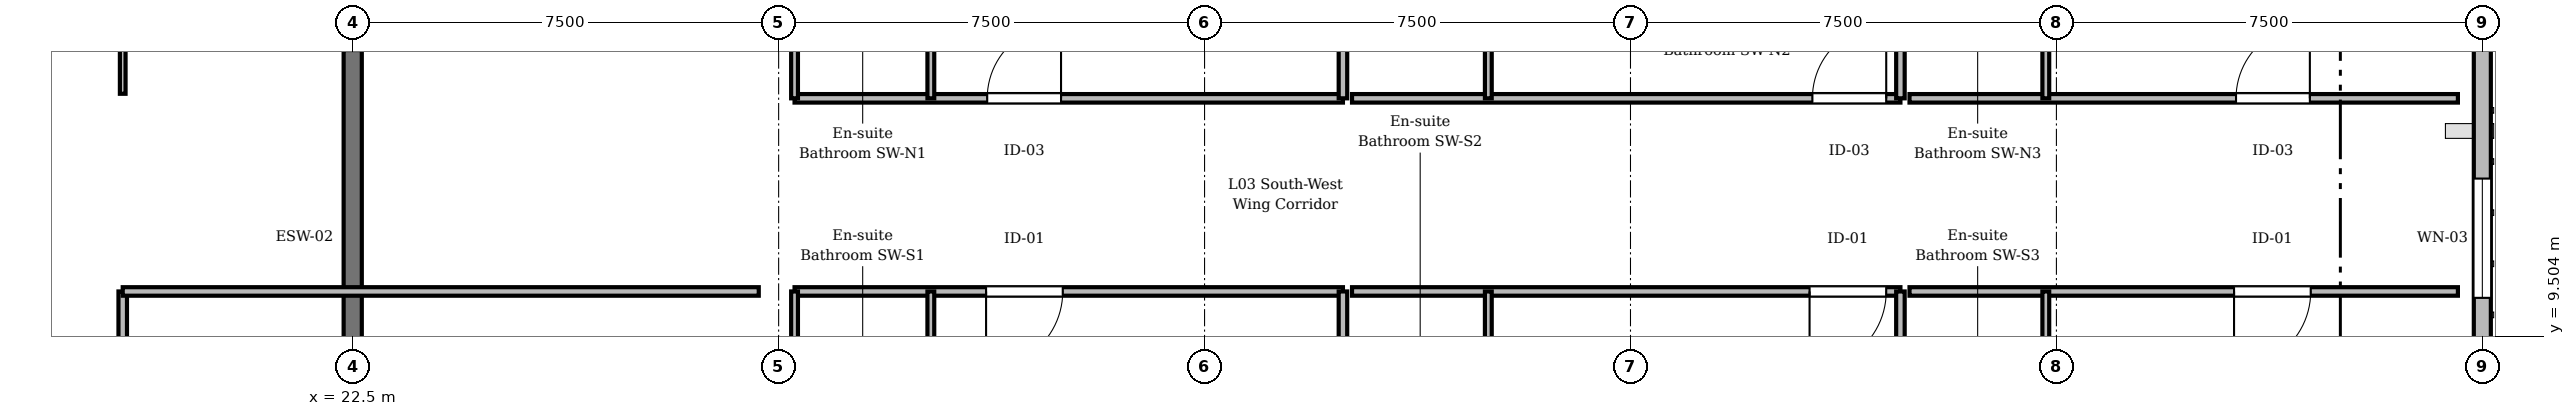
"""IFC4 building model, lengths in metres.
Left out: names, types, materials, properties, quantities, classifications, styles, units other than length and angle.
Written with IfcOpenShell. Run it as: python <this file> out.ifc"""

import sys

from ifc_helpers import new_model, si_unit, direction, frame, frame_2d, origin, place, context, subcontext, project, spatial, rectangle, extrude, element, fill, save


model = new_model("IFC4")
c1 = context("Model", 3, precision=1e-05, world=origin(), true_north=direction((0.0, 1.0)))
c2 = subcontext(c1, "Body", "Model", "MODEL_VIEW")
j1 = project(units=[si_unit("LENGTHUNIT", "METRE"), si_unit("PLANEANGLEUNIT", "RADIAN")], contexts=[c1])
p1 = place(None, origin())
s1 = spatial("IfcSite", under=j1, at=p1, CompositionType="ELEMENT")
p2 = place(p1, origin())
s2 = spatial("IfcBuilding", under=s1, at=p2, CompositionType="ELEMENT")
p3 = place(p2, frame((0.0, 0.0, 14.1)))
s3 = spatial("IfcBuildingStorey", under=s2, at=p3, CompositionType="ELEMENT", Elevation=14.1)
p4 = place(p3, frame((22.5, 7.95, 0.0), z_axis=(0.0, 0.0, 1.0), x_axis=(0.0, 1.0, 0.0)))
e1 = element("IfcWall", 1, at=p4, inside=s3, PredefinedType="SHEAR", context=c2, shape_type="SweptSolid", body=[
    extrude(rectangle(XDim=6.6, YDim=0.32, at=frame_2d((3.3, 0.0))), origin(), (0.0, 0.0, 1.0), 2.92),
])
p5 = place(p3, frame((60.0, 14.715, 0.0), z_axis=(0.0, 0.0, 1.0), x_axis=(0.0, -1.0, 0.0)))
e2 = element("IfcWall", 2, at=p5, inside=s3, PredefinedType="STANDARD", context=c2, shape_type="SweptSolid", body=[
    extrude(rectangle(XDim=6.955, YDim=0.3, at=frame_2d((3.478, 0.0))), origin(), (0.0, 0.0, 1.0), 2.87),
])
p6 = place(p5, frame((2.427, 0.0, 0.9)))
e3 = element("IfcOpeningElement", 3, at=p6, cuts=e2, PredefinedType="OPENING", context=c2, shape_type="SweptSolid", body=[
    extrude(rectangle(XDim=2.1, YDim=1.69, at=frame_2d((1.05, 0.845))), frame((0.0, 0.16, 0.0), z_axis=(0.0, -1.0, 0.0), x_axis=(1.0, 0.0, 0.0)), (0.0, 0.0, 1.0), 0.32),
])
p7 = place(p3, frame((18.45, 10.3, 0.0), z_axis=(0.0, 0.0, 1.0), x_axis=(0.0, -1.0, 0.0)))
e4 = element("IfcWall", 4, at=p7, inside=s3, PredefinedType="PARTITIONING", context=c2, shape_type="SweptSolid", body=[
    extrude(rectangle(XDim=9.95, YDim=0.15, at=frame_2d((4.975, 0.0))), origin(), (0.0, 0.0, 1.0), 3.455),
])
p8 = place(p7, frame((5.92, 0.0, 0.0)))
e5 = element("IfcOpeningElement", 5, at=p8, cuts=e4, PredefinedType="OPENING", context=c2, shape_type="SweptSolid", body=[
    extrude(rectangle(XDim=1.35, YDim=2.25, at=frame_2d((0.675, 1.125))), frame((0.0, 0.085, 0.0), z_axis=(0.0, -1.0, 0.0), x_axis=(1.0, 0.0, 0.0)), (0.0, 0.0, 1.0), 0.17),
])
p9 = place(p3, frame((18.45, 21.515, 0.0), z_axis=(0.0, 0.0, 1.0), x_axis=(0.0, -1.0, 0.0)))
e6 = element("IfcWall", 6, at=p9, inside=s3, PredefinedType="PARTITIONING", context=c2, shape_type="SweptSolid", body=[
    extrude(rectangle(XDim=7.735, YDim=0.1, at=frame_2d((3.867, 0.0))), origin(), (0.0, 0.0, 1.0), 3.455),
])
p10 = place(p9, frame((2.075, 0.0, 0.0)))
e7 = element("IfcOpeningElement", 7, at=p10, cuts=e6, PredefinedType="OPENING", context=c2, shape_type="SweptSolid", body=[
    extrude(rectangle(XDim=1.15, YDim=2.2, at=frame_2d((0.575, 1.1))), frame((0.0, 0.06, 0.0), z_axis=(0.0, -1.0, 0.0), x_axis=(1.0, 0.0, 0.0)), (0.0, 0.0, 1.0), 0.12),
])
p11 = place(p3, frame((39.937, 10.3, 0.0), z_axis=(0.0, 0.0, 1.0), x_axis=(-1.0, 0.0, 0.0)))
e8 = element("IfcWall", 8, at=p11, inside=s3, PredefinedType="PARTITIONING", context=c2, shape_type="SweptSolid", body=[
    extrude(rectangle(XDim=9.657, YDim=0.15, at=frame_2d((4.828, 0.0))), origin(), (0.0, 0.0, 1.0), 3.455),
])
p12 = place(p11, frame((4.934, 0.0, 0.0)))
e9 = element("IfcOpeningElement", 9, at=p12, cuts=e8, PredefinedType="OPENING", context=c2, shape_type="SweptSolid", body=[
    extrude(rectangle(XDim=1.35, YDim=2.25, at=frame_2d((0.675, 1.125))), frame((0.0, 0.085, 0.0), z_axis=(0.0, -1.0, 0.0), x_axis=(1.0, 0.0, 0.0)), (0.0, 0.0, 1.0), 0.17),
])
p13 = place(p3, frame((32.68, 8.3, 0.0), z_axis=(0.0, 0.0, 1.0), x_axis=(0.0, 1.0, 0.0)))
e10 = element("IfcWall", 10, at=p13, inside=s3, PredefinedType="PARTITIONING", context=c2, shape_type="SweptSolid", body=[
    extrude(rectangle(XDim=2.0, YDim=0.12, at=frame_2d((1.0, 0.0))), origin(), (0.0, 0.0, 1.0), 3.455),
])
p14 = place(p3, frame((30.28, 13.7, 0.0), z_axis=(0.0, 0.0, 1.0), x_axis=(1.0, 0.0, 0.0)))
e11 = element("IfcWall", 11, at=p14, inside=s3, PredefinedType="PARTITIONING", context=c2, shape_type="SweptSolid", body=[
    extrude(rectangle(XDim=9.657, YDim=0.15, at=frame_2d((4.828, 0.0))), origin(), (0.0, 0.0, 1.0), 3.455),
])
p15 = place(p14, frame((3.393, 0.0, 0.0)))
e12 = element("IfcOpeningElement", 12, at=p15, cuts=e11, PredefinedType="OPENING", context=c2, shape_type="SweptSolid", body=[
    extrude(rectangle(XDim=1.3, YDim=2.2, at=frame_2d((0.65, 1.1))), frame((0.0, 0.085, 0.0), z_axis=(0.0, -1.0, 0.0), x_axis=(1.0, 0.0, 0.0)), (0.0, 0.0, 1.0), 0.17),
])
p16 = place(p3, frame((32.68, 13.7, 0.0), z_axis=(0.0, 0.0, 1.0), x_axis=(0.0, 1.0, 0.0)))
e13 = element("IfcWall", 13, at=p16, inside=s3, PredefinedType="PARTITIONING", context=c2, shape_type="SweptSolid", body=[
    extrude(rectangle(XDim=2.0, YDim=0.12, at=frame_2d((1.0, 0.0))), origin(), (0.0, 0.0, 1.0), 3.455),
])
p17 = place(p3, frame((49.753, 10.3, 0.0), z_axis=(0.0, 0.0, 1.0), x_axis=(-1.0, 0.0, 0.0)))
e14 = element("IfcWall", 14, at=p17, inside=s3, PredefinedType="PARTITIONING", context=c2, shape_type="SweptSolid", body=[
    extrude(rectangle(XDim=9.657, YDim=0.15, at=frame_2d((4.828, 0.0))), origin(), (0.0, 0.0, 1.0), 3.455),
])
p18 = place(p17, frame((0.25, 0.0, 0.0)))
e15 = element("IfcOpeningElement", 15, at=p18, cuts=e14, PredefinedType="OPENING", context=c2, shape_type="SweptSolid", body=[
    extrude(rectangle(XDim=1.35, YDim=2.25, at=frame_2d((0.675, 1.125))), frame((0.0, 0.085, 0.0), z_axis=(0.0, -1.0, 0.0), x_axis=(1.0, 0.0, 0.0)), (0.0, 0.0, 1.0), 0.17),
])
p19 = place(p3, frame((42.497, 8.3, 0.0), z_axis=(0.0, 0.0, 1.0), x_axis=(0.0, 1.0, 0.0)))
e16 = element("IfcWall", 16, at=p19, inside=s3, PredefinedType="PARTITIONING", context=c2, shape_type="SweptSolid", body=[
    extrude(rectangle(XDim=2.0, YDim=0.12, at=frame_2d((1.0, 0.0))), origin(), (0.0, 0.0, 1.0), 3.455),
])
p20 = place(p3, frame((40.097, 13.7, 0.0), z_axis=(0.0, 0.0, 1.0), x_axis=(1.0, 0.0, 0.0)))
e17 = element("IfcWall", 17, at=p20, inside=s3, PredefinedType="PARTITIONING", context=c2, shape_type="SweptSolid", body=[
    extrude(rectangle(XDim=9.657, YDim=0.15, at=frame_2d((4.828, 0.0))), origin(), (0.0, 0.0, 1.0), 3.455),
])
p21 = place(p20, frame((8.107, 0.0, 0.0)))
e18 = element("IfcOpeningElement", 18, at=p21, cuts=e17, PredefinedType="OPENING", context=c2, shape_type="SweptSolid", body=[
    extrude(rectangle(XDim=1.3, YDim=2.2, at=frame_2d((0.65, 1.1))), frame((0.0, 0.085, 0.0), z_axis=(0.0, -1.0, 0.0), x_axis=(1.0, 0.0, 0.0)), (0.0, 0.0, 1.0), 0.17),
])
p22 = place(p3, frame((42.497, 13.7, 0.0), z_axis=(0.0, 0.0, 1.0), x_axis=(0.0, 1.0, 0.0)))
e19 = element("IfcWall", 19, at=p22, inside=s3, PredefinedType="PARTITIONING", context=c2, shape_type="SweptSolid", body=[
    extrude(rectangle(XDim=2.0, YDim=0.12, at=frame_2d((1.0, 0.0))), origin(), (0.0, 0.0, 1.0), 3.455),
])
p23 = place(p3, frame((59.57, 10.3, 0.0), z_axis=(0.0, 0.0, 1.0), x_axis=(-1.0, 0.0, 0.0)))
e20 = element("IfcWall", 20, at=p23, inside=s3, PredefinedType="PARTITIONING", context=c2, shape_type="SweptSolid", body=[
    extrude(rectangle(XDim=9.657, YDim=0.15, at=frame_2d((4.828, 0.0))), origin(), (0.0, 0.0, 1.0), 3.455),
])
p24 = place(p23, frame((2.592, 0.0, 0.0)))
e21 = element("IfcOpeningElement", 21, at=p24, cuts=e20, PredefinedType="OPENING", context=c2, shape_type="SweptSolid", body=[
    extrude(rectangle(XDim=1.35, YDim=2.25, at=frame_2d((0.675, 1.125))), frame((0.0, 0.085, 0.0), z_axis=(0.0, -1.0, 0.0), x_axis=(1.0, 0.0, 0.0)), (0.0, 0.0, 1.0), 0.17),
])
p25 = place(p3, frame((52.313, 8.3, 0.0), z_axis=(0.0, 0.0, 1.0), x_axis=(0.0, 1.0, 0.0)))
e22 = element("IfcWall", 22, at=p25, inside=s3, PredefinedType="PARTITIONING", context=c2, shape_type="SweptSolid", body=[
    extrude(rectangle(XDim=2.0, YDim=0.12, at=frame_2d((1.0, 0.0))), origin(), (0.0, 0.0, 1.0), 2.905),
])
p26 = place(p3, frame((49.913, 13.7, 0.0), z_axis=(0.0, 0.0, 1.0), x_axis=(1.0, 0.0, 0.0)))
e23 = element("IfcWall", 23, at=p26, inside=s3, PredefinedType="PARTITIONING", context=c2, shape_type="SweptSolid", body=[
    extrude(rectangle(XDim=9.657, YDim=0.15, at=frame_2d((4.828, 0.0))), origin(), (0.0, 0.0, 1.0), 3.455),
])
p27 = place(p26, frame((5.75, 0.0, 0.0)))
e24 = element("IfcOpeningElement", 24, at=p27, cuts=e23, PredefinedType="OPENING", context=c2, shape_type="SweptSolid", body=[
    extrude(rectangle(XDim=1.3, YDim=2.2, at=frame_2d((0.65, 1.1))), frame((0.0, 0.085, 0.0), z_axis=(0.0, -1.0, 0.0), x_axis=(1.0, 0.0, 0.0)), (0.0, 0.0, 1.0), 0.17),
])
p28 = place(p3, frame((52.313, 13.7, 0.0), z_axis=(0.0, 0.0, 1.0), x_axis=(0.0, 1.0, 0.0)))
e25 = element("IfcWall", 25, at=p28, inside=s3, PredefinedType="PARTITIONING", context=c2, shape_type="SweptSolid", body=[
    extrude(rectangle(XDim=2.0, YDim=0.12, at=frame_2d((1.0, 0.0))), origin(), (0.0, 0.0, 1.0), 2.905),
])
p29 = place(p3, frame((18.45, 10.3, 0.0), z_axis=(0.0, 0.0, 1.0), x_axis=(1.0, 0.0, 0.0)))
e26 = element("IfcWall", 26, at=p29, inside=s3, PredefinedType="PARTITIONING", context=c2, shape_type="SweptSolid", body=[
    extrude(rectangle(XDim=11.2, YDim=0.15, at=frame_2d((5.6, 0.0))), origin(), (0.0, 0.0, 1.0), 3.455),
])
p30 = place(p3, frame((39.937, 0.35, 0.0), z_axis=(0.0, 0.0, 1.0), x_axis=(0.0, 1.0, 0.0)))
e27 = element("IfcWall", 27, at=p30, inside=s3, PredefinedType="PARTITIONING", context=c2, shape_type="SweptSolid", body=[
    extrude(rectangle(XDim=9.95, YDim=0.15, at=frame_2d((4.975, 0.0))), origin(), (0.0, 0.0, 1.0), 3.455),
])
p31 = place(p3, frame((39.937, 13.7, 0.0), z_axis=(0.0, 0.0, 1.0), x_axis=(0.0, 1.0, 0.0)))
e28 = element("IfcWall", 28, at=p31, inside=s3, PredefinedType="PARTITIONING", context=c2, shape_type="SweptSolid", body=[
    extrude(rectangle(XDim=8.45, YDim=0.15, at=frame_2d((4.225, 0.0))), origin(), (0.0, 0.0, 1.0), 3.455),
])
p32 = place(p3, frame((49.753, 0.35, 0.0), z_axis=(0.0, 0.0, 1.0), x_axis=(0.0, 1.0, 0.0)))
e29 = element("IfcWall", 29, at=p32, inside=s3, PredefinedType="PARTITIONING", context=c2, shape_type="SweptSolid", body=[
    extrude(rectangle(XDim=9.95, YDim=0.15, at=frame_2d((4.975, 0.0))), origin(), (0.0, 0.0, 1.0), 3.455),
])
p33 = place(p3, frame((49.753, 13.7, 0.0), z_axis=(0.0, 0.0, 1.0), x_axis=(0.0, 1.0, 0.0)))
e30 = element("IfcWall", 30, at=p33, inside=s3, PredefinedType="PARTITIONING", context=c2, shape_type="SweptSolid", body=[
    extrude(rectangle(XDim=8.45, YDim=0.15, at=frame_2d((4.225, 0.0))), origin(), (0.0, 0.0, 1.0), 3.455),
])
p34 = place(p3, frame((30.28, 8.3, 0.0), z_axis=(0.0, 0.0, 1.0), x_axis=(0.0, 1.0, 0.0)))
e31 = element("IfcWall", 31, at=p34, inside=s3, PredefinedType="PARTITIONING", context=c2, shape_type="SweptSolid", body=[
    extrude(rectangle(XDim=2.0, YDim=0.12, at=frame_2d((1.0, 0.0))), origin(), (0.0, 0.0, 1.0), 2.955),
])
p35 = place(p3, frame((30.28, 13.7, 0.0), z_axis=(0.0, 0.0, 1.0), x_axis=(0.0, 1.0, 0.0)))
e32 = element("IfcWall", 32, at=p35, inside=s3, PredefinedType="PARTITIONING", context=c2, shape_type="SweptSolid", body=[
    extrude(rectangle(XDim=2.0, YDim=0.12, at=frame_2d((1.0, 0.0))), origin(), (0.0, 0.0, 1.0), 2.905),
])
p36 = place(p6, origin())
e33 = element("IfcWindow", 33, at=p36, inside=s3, PartitioningType="SINGLE_PANEL", PredefinedType="WINDOW", context=c2, shape_type="SweptSolid", body=[
    extrude(rectangle(XDim=2.1, YDim=1.69, at=frame_2d((1.05, 0.845))), frame((0.0, 0.03, 0.0), z_axis=(0.0, -1.0, 0.0), x_axis=(1.0, 0.0, 0.0)), (0.0, 0.0, 1.0), 0.06),
])
fill(e3, e33)
p37 = place(p12, origin())
e34 = element("IfcDoor", 34, at=p37, inside=s3, OperationType="SINGLE_SWING_RIGHT", PredefinedType="DOOR", context=c2, shape_type="SweptSolid", body=[
    extrude(rectangle(XDim=1.35, YDim=2.25, at=frame_2d((0.675, 1.125))), frame((0.0, 0.025, 0.0), z_axis=(0.0, -1.0, 0.0), x_axis=(1.0, 0.0, 0.0)), (0.0, 0.0, 1.0), 0.05),
])
fill(e9, e34)
p38 = place(p15, origin())
e35 = element("IfcDoor", 35, at=p38, inside=s3, OperationType="SINGLE_SWING_RIGHT", PredefinedType="DOOR", context=c2, shape_type="SweptSolid", body=[
    extrude(rectangle(XDim=1.3, YDim=2.2, at=frame_2d((0.65, 1.1))), frame((0.0, 0.025, 0.0), z_axis=(0.0, -1.0, 0.0), x_axis=(1.0, 0.0, 0.0)), (0.0, 0.0, 1.0), 0.05),
])
fill(e12, e35)
p39 = place(p18, origin())
e36 = element("IfcDoor", 36, at=p39, inside=s3, OperationType="SINGLE_SWING_RIGHT", PredefinedType="DOOR", context=c2, shape_type="SweptSolid", body=[
    extrude(rectangle(XDim=1.35, YDim=2.25, at=frame_2d((0.675, 1.125))), frame((0.0, 0.025, 0.0), z_axis=(0.0, -1.0, 0.0), x_axis=(1.0, 0.0, 0.0)), (0.0, 0.0, 1.0), 0.05),
])
fill(e15, e36)
p40 = place(p21, origin())
e37 = element("IfcDoor", 37, at=p40, inside=s3, OperationType="SINGLE_SWING_RIGHT", PredefinedType="DOOR", context=c2, shape_type="SweptSolid", body=[
    extrude(rectangle(XDim=1.3, YDim=2.2, at=frame_2d((0.65, 1.1))), frame((0.0, 0.025, 0.0), z_axis=(0.0, -1.0, 0.0), x_axis=(1.0, 0.0, 0.0)), (0.0, 0.0, 1.0), 0.05),
])
fill(e18, e37)
p41 = place(p24, origin())
e38 = element("IfcDoor", 38, at=p41, inside=s3, OperationType="SINGLE_SWING_RIGHT", PredefinedType="DOOR", context=c2, shape_type="SweptSolid", body=[
    extrude(rectangle(XDim=1.35, YDim=2.25, at=frame_2d((0.675, 1.125))), frame((0.0, 0.025, 0.0), z_axis=(0.0, -1.0, 0.0), x_axis=(1.0, 0.0, 0.0)), (0.0, 0.0, 1.0), 0.05),
])
fill(e21, e38)
p42 = place(p27, origin())
e39 = element("IfcDoor", 39, at=p42, inside=s3, OperationType="SINGLE_SWING_RIGHT", PredefinedType="DOOR", context=c2, shape_type="SweptSolid", body=[
    extrude(rectangle(XDim=1.3, YDim=2.2, at=frame_2d((0.65, 1.1))), frame((0.0, 0.025, 0.0), z_axis=(0.0, -1.0, 0.0), x_axis=(1.0, 0.0, 0.0)), (0.0, 0.0, 1.0), 0.05),
])
fill(e24, e39)
save(model, sys.argv[1])
